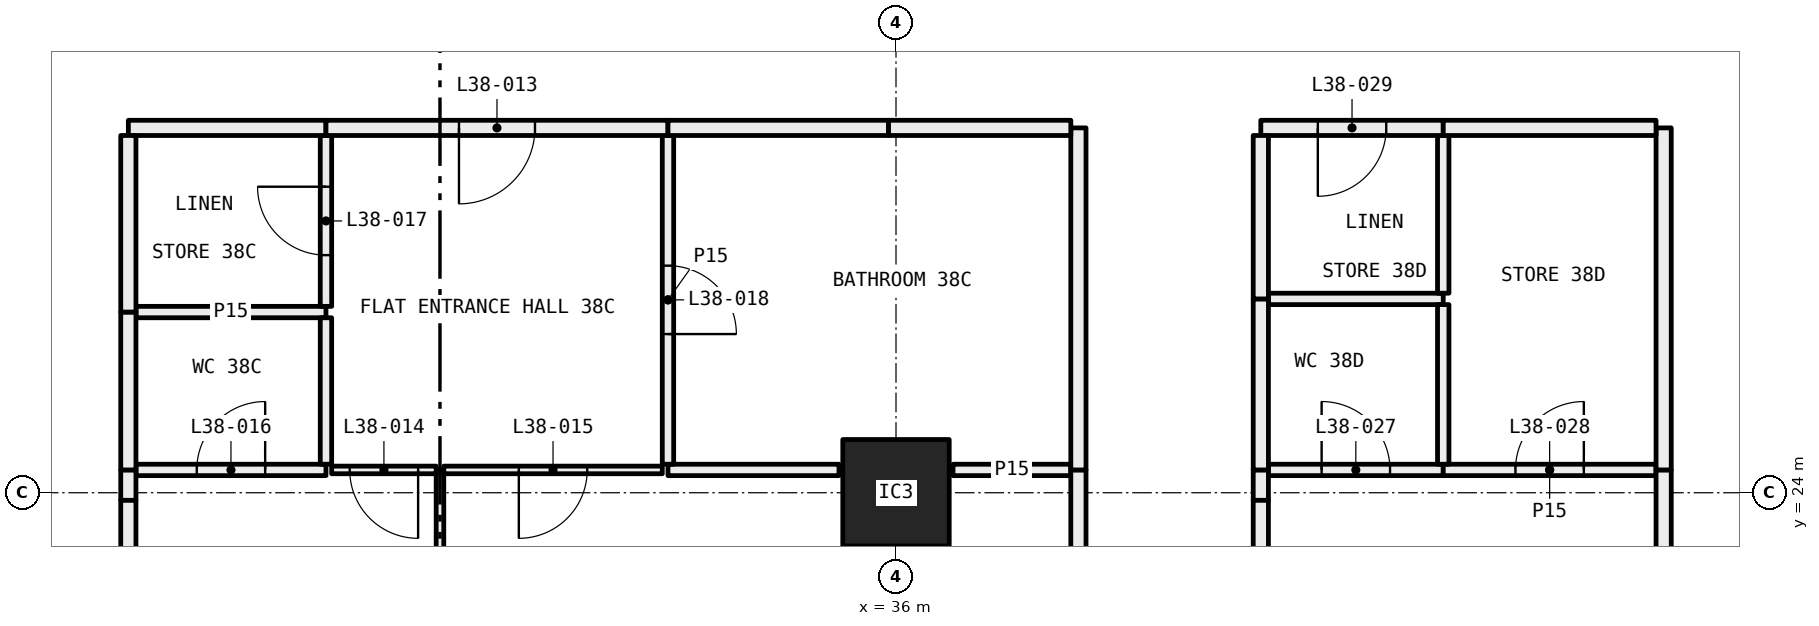
"""IFC4 building model, lengths in metres.
Left out: names, types, materials, properties, quantities, classifications, styles, units other than length and angle.
Written with IfcOpenShell. Run it as: python <this file> out.ifc"""

import sys

from ifc_helpers import new_model, si_unit, direction, frame, frame_2d, origin, origin_2d, place, context, subcontext, project, spatial, rectangle, hollow_rectangle, extrude, element, fill, save


model = new_model("IFC4")
c1 = context("Model", 3, precision=1e-05, world=origin(), true_north=direction((0.0, 1.0)))
c2 = subcontext(c1, "Body", "Model", "MODEL_VIEW")
j1 = project(units=[si_unit("LENGTHUNIT", "METRE"), si_unit("PLANEANGLEUNIT", "RADIAN")], contexts=[c1])
p1 = place(None, origin())
s1 = spatial("IfcSite", under=j1, at=p1, CompositionType="ELEMENT")
p2 = place(p1, origin())
s2 = spatial("IfcBuilding", under=s1, at=p2, CompositionType="ELEMENT")
p3 = place(p2, frame((0.0, 0.0, 144.9)))
s3 = spatial("IfcBuildingStorey", under=s2, at=p3, CompositionType="ELEMENT", Elevation=144.9)
p4 = place(p3, frame((36.0, 24.0, 0.0), z_axis=(0.0, 0.0, 1.0), x_axis=(1.0, 0.0, 0.0)))
e1 = element("IfcColumn", 1, at=p4, inside=s3, PredefinedType="COLUMN", context=c2, shape_type="SweptSolid", body=[
    extrude(hollow_rectangle(XDim=1.4, YDim=1.4, WallThickness=0.06, at=origin_2d()), origin(), (0.0, 0.0, 1.0), 3.05),
])
p5 = place(p3, frame((30.0, 18.1, 0.0), z_axis=(0.0, 0.0, 1.0), x_axis=(0.0, 1.0, 0.0)))
e2 = element("IfcWall", 2, at=p5, inside=s3, PredefinedType="PARTITIONING", context=c2, shape_type="SweptSolid", body=[
    extrude(rectangle(XDim=6.2, YDim=0.1, at=frame_2d((3.1, 0.0))), origin(), (0.0, 0.0, 1.0), 2.45),
])
p6 = place(p3, frame((28.5, 24.3, 0.0), z_axis=(0.0, 0.0, 1.0), x_axis=(-1.0, 0.0, 0.0)))
e3 = element("IfcWall", 3, at=p6, inside=s3, PredefinedType="PARTITIONING", context=c2, shape_type="SweptSolid", body=[
    extrude(rectangle(XDim=2.5, YDim=0.15, at=frame_2d((1.25, 0.0))), origin(), (0.0, 0.0, 1.0), 3.05),
])
p7 = place(p6, frame((0.8, 0.0, 0.0)))
e4 = element("IfcOpeningElement", 4, at=p7, cuts=e3, PredefinedType="OPENING", context=c2, shape_type="SweptSolid", body=[
    extrude(rectangle(XDim=0.9, YDim=2.1, at=frame_2d((0.45, 1.05))), frame((0.0, 0.085, 0.0), z_axis=(0.0, -1.0, 0.0), x_axis=(1.0, 0.0, 0.0)), (0.0, 0.0, 1.0), 0.17),
])
p8 = place(p3, frame((29.95, 24.3, 0.0), z_axis=(0.0, 0.0, 1.0), x_axis=(-1.0, 0.0, 0.0)))
e5 = element("IfcWall", 5, at=p8, inside=s3, PredefinedType="PARTITIONING", context=c2, shape_type="SweptSolid", body=[
    extrude(rectangle(XDim=1.375, YDim=0.1, at=frame_2d((0.688, 0.0))), origin(), (0.0, 0.0, 1.0), 3.05),
])
p9 = place(p8, frame((0.238, 0.0, 0.0)))
e6 = element("IfcOpeningElement", 6, at=p9, cuts=e5, PredefinedType="OPENING", context=c2, shape_type="SweptSolid", body=[
    extrude(rectangle(XDim=0.9, YDim=2.1, at=frame_2d((0.45, 1.05))), frame((0.0, 0.06, 0.0), z_axis=(0.0, -1.0, 0.0), x_axis=(1.0, 0.0, 0.0)), (0.0, 0.0, 1.0), 0.12),
])
p10 = place(p3, frame((25.9, 24.3, 0.0), z_axis=(0.0, 0.0, 1.0), x_axis=(0.0, -1.0, 0.0)))
e7 = element("IfcWall", 7, at=p10, inside=s3, PredefinedType="PARTITIONING", context=c2, shape_type="SweptSolid", body=[
    extrude(rectangle(XDim=0.4, YDim=0.2, at=frame_2d((0.2, 0.0))), origin(), (0.0, 0.0, 1.0), 2.45),
])
p11 = place(p3, frame((25.9, 23.9, 0.0), z_axis=(0.0, 0.0, 1.0), x_axis=(0.0, -1.0, 0.0)))
e8 = element("IfcWall", 8, at=p11, inside=s3, PredefinedType="PARTITIONING", context=c2, shape_type="SweptSolid", body=[
    extrude(rectangle(XDim=5.8, YDim=0.2, at=frame_2d((2.9, 0.0))), origin(), (0.0, 0.0, 1.0), 3.05),
])
p12 = place(p3, frame((32.925, 24.3, 0.0), z_axis=(0.0, 0.0, 1.0), x_axis=(-1.0, 0.0, 0.0)))
e9 = element("IfcWall", 9, at=p12, inside=s3, PredefinedType="PARTITIONING", context=c2, shape_type="SweptSolid", body=[
    extrude(rectangle(XDim=2.875, YDim=0.1, at=frame_2d((1.438, 0.0))), origin(), (0.0, 0.0, 1.0), 3.05),
])
p13 = place(p12, frame((0.988, 0.0, 0.0)))
e10 = element("IfcOpeningElement", 10, at=p13, cuts=e9, PredefinedType="OPENING", context=c2, shape_type="SweptSolid", body=[
    extrude(rectangle(XDim=0.9, YDim=2.1, at=frame_2d((0.45, 1.05))), frame((0.0, 0.06, 0.0), z_axis=(0.0, -1.0, 0.0), x_axis=(1.0, 0.0, 0.0)), (0.0, 0.0, 1.0), 0.12),
])
p14 = place(p3, frame((35.25, 24.3, 0.0), z_axis=(0.0, 0.0, 1.0), x_axis=(-1.0, 0.0, 0.0)))
e11 = element("IfcWall", 11, at=p14, inside=s3, PredefinedType="PARTITIONING", context=c2, shape_type="SweptSolid", body=[
    extrude(rectangle(XDim=2.25, YDim=0.15, at=frame_2d((1.125, 0.0))), origin(), (0.0, 0.0, 1.0), 3.05),
])
p15 = place(p3, frame((38.3, 24.3, 0.0), z_axis=(0.0, 0.0, 1.0), x_axis=(-1.0, 0.0, 0.0)))
e12 = element("IfcWall", 12, at=p15, inside=s3, PredefinedType="PARTITIONING", context=c2, shape_type="SweptSolid", body=[
    extrude(rectangle(XDim=1.55, YDim=0.15, at=frame_2d((0.775, 0.0))), origin(), (0.0, 0.0, 1.0), 3.05),
])
p16 = place(p3, frame((38.4, 18.1, 0.0), z_axis=(0.0, 0.0, 1.0), x_axis=(0.0, 1.0, 0.0)))
e13 = element("IfcWall", 13, at=p16, inside=s3, PredefinedType="PARTITIONING", context=c2, shape_type="SweptSolid", body=[
    extrude(rectangle(XDim=6.2, YDim=0.2, at=frame_2d((3.1, 0.0))), origin(), (0.0, 0.0, 1.0), 2.45),
])
p17 = place(p3, frame((28.5, 26.377, 0.0), z_axis=(0.0, 0.0, 1.0), x_axis=(-1.0, 0.0, 0.0)))
e14 = element("IfcWall", 14, at=p17, inside=s3, PredefinedType="PARTITIONING", context=c2, shape_type="SweptSolid", body=[
    extrude(rectangle(XDim=2.5, YDim=0.15, at=frame_2d((1.25, 0.0))), origin(), (0.0, 0.0, 1.0), 3.05),
])
p18 = place(p3, frame((28.5, 24.375, 0.0), z_axis=(0.0, 0.0, 1.0), x_axis=(0.0, 1.0, 0.0)))
e15 = element("IfcWall", 15, at=p18, inside=s3, PredefinedType="PARTITIONING", context=c2, shape_type="SweptSolid", body=[
    extrude(rectangle(XDim=1.927, YDim=0.15, at=frame_2d((0.963, 0.0))), origin(), (0.0, 0.0, 1.0), 3.05),
])
p19 = place(p3, frame((25.9, 26.377, 0.0), z_axis=(0.0, 0.0, 1.0), x_axis=(0.0, -1.0, 0.0)))
e16 = element("IfcWall", 16, at=p19, inside=s3, PredefinedType="PARTITIONING", context=c2, shape_type="SweptSolid", body=[
    extrude(rectangle(XDim=2.077, YDim=0.2, at=frame_2d((1.039, 0.0))), origin(), (0.0, 0.0, 1.0), 3.05),
])
p20 = place(p3, frame((28.5, 26.452, 0.0), z_axis=(0.0, 0.0, 1.0), x_axis=(0.0, 1.0, 0.0)))
e17 = element("IfcWall", 17, at=p20, inside=s3, PredefinedType="PARTITIONING", context=c2, shape_type="SweptSolid", body=[
    extrude(rectangle(XDim=2.248, YDim=0.15, at=frame_2d((1.124, 0.0))), origin(), (0.0, 0.0, 1.0), 3.05),
])
p21 = place(p20, frame((0.674, 0.0, 0.0)))
e18 = element("IfcOpeningElement", 18, at=p21, cuts=e17, PredefinedType="OPENING", context=c2, shape_type="SweptSolid", body=[
    extrude(rectangle(XDim=0.9, YDim=2.1, at=frame_2d((0.45, 1.05))), frame((0.0, 0.085, 0.0), z_axis=(0.0, -1.0, 0.0), x_axis=(1.0, 0.0, 0.0)), (0.0, 0.0, 1.0), 0.17),
])
p22 = place(p3, frame((28.5, 28.8, 0.0), z_axis=(0.0, 0.0, 1.0), x_axis=(-1.0, 0.0, 0.0)))
e19 = element("IfcWall", 19, at=p22, inside=s3, PredefinedType="PARTITIONING", context=c2, shape_type="SweptSolid", body=[
    extrude(rectangle(XDim=2.6, YDim=0.2, at=frame_2d((1.3, 0.0))), origin(), (0.0, 0.0, 1.0), 3.05),
])
p23 = place(p3, frame((25.9, 28.7, 0.0), z_axis=(0.0, 0.0, 1.0), x_axis=(0.0, -1.0, 0.0)))
e20 = element("IfcWall", 20, at=p23, inside=s3, PredefinedType="PARTITIONING", context=c2, shape_type="SweptSolid", body=[
    extrude(rectangle(XDim=2.323, YDim=0.2, at=frame_2d((1.162, 0.0))), origin(), (0.0, 0.0, 1.0), 3.05),
])
p24 = place(p3, frame((33.0, 24.375, 0.0), z_axis=(0.0, 0.0, 1.0), x_axis=(0.0, 1.0, 0.0)))
e21 = element("IfcWall", 21, at=p24, inside=s3, PredefinedType="PARTITIONING", context=c2, shape_type="SweptSolid", body=[
    extrude(rectangle(XDim=4.325, YDim=0.15, at=frame_2d((2.163, 0.0))), origin(), (0.0, 0.0, 1.0), 3.05),
])
p25 = place(p24, frame((1.712, 0.0, 0.0)))
e22 = element("IfcOpeningElement", 22, at=p25, cuts=e21, PredefinedType="OPENING", context=c2, shape_type="SweptSolid", body=[
    extrude(rectangle(XDim=0.9, YDim=2.1, at=frame_2d((0.45, 1.05))), frame((0.0, 0.085, 0.0), z_axis=(0.0, -1.0, 0.0), x_axis=(1.0, 0.0, 0.0)), (0.0, 0.0, 1.0), 0.17),
])
p26 = place(p3, frame((33.0, 28.8, 0.0), z_axis=(0.0, 0.0, 1.0), x_axis=(-1.0, 0.0, 0.0)))
e23 = element("IfcWall", 23, at=p26, inside=s3, PredefinedType="PARTITIONING", context=c2, shape_type="SweptSolid", body=[
    extrude(rectangle(XDim=4.5, YDim=0.2, at=frame_2d((2.25, 0.0))), origin(), (0.0, 0.0, 1.0), 3.05),
])
p27 = place(p26, frame((1.75, 0.0, 0.0)))
e24 = element("IfcOpeningElement", 24, at=p27, cuts=e23, PredefinedType="OPENING", context=c2, shape_type="SweptSolid", body=[
    extrude(rectangle(XDim=1.0, YDim=2.1, at=frame_2d((0.5, 1.05))), frame((0.0, 0.11, 0.0), z_axis=(0.0, -1.0, 0.0), x_axis=(1.0, 0.0, 0.0)), (0.0, 0.0, 1.0), 0.22),
])
p28 = place(p3, frame((38.4, 24.3, 0.0), z_axis=(0.0, 0.0, 1.0), x_axis=(0.0, 1.0, 0.0)))
e25 = element("IfcWall", 25, at=p28, inside=s3, PredefinedType="PARTITIONING", context=c2, shape_type="SweptSolid", body=[
    extrude(rectangle(XDim=4.5, YDim=0.2, at=frame_2d((2.25, 0.0))), origin(), (0.0, 0.0, 1.0), 3.05),
])
p29 = place(p3, frame((38.3, 28.8, 0.0), z_axis=(0.0, 0.0, 1.0), x_axis=(-1.0, 0.0, 0.0)))
e26 = element("IfcWall", 26, at=p29, inside=s3, PredefinedType="PARTITIONING", context=c2, shape_type="SweptSolid", body=[
    extrude(rectangle(XDim=2.4, YDim=0.2, at=frame_2d((1.2, 0.0))), origin(), (0.0, 0.0, 1.0), 2.45),
])
p30 = place(p3, frame((35.9, 28.8, 0.0), z_axis=(0.0, 0.0, 1.0), x_axis=(-1.0, 0.0, 0.0)))
e27 = element("IfcWall", 27, at=p30, inside=s3, PredefinedType="PARTITIONING", context=c2, shape_type="SweptSolid", body=[
    extrude(rectangle(XDim=2.9, YDim=0.2, at=frame_2d((1.45, 0.0))), origin(), (0.0, 0.0, 1.0), 3.05),
])
p31 = place(p3, frame((43.2, 24.3, 0.0), z_axis=(0.0, 0.0, 1.0), x_axis=(-1.0, 0.0, 0.0)))
e28 = element("IfcWall", 28, at=p31, inside=s3, PredefinedType="PARTITIONING", context=c2, shape_type="SweptSolid", body=[
    extrude(rectangle(XDim=2.3, YDim=0.15, at=frame_2d((1.15, 0.0))), origin(), (0.0, 0.0, 1.0), 3.05),
])
p32 = place(p31, frame((0.7, 0.0, 0.0)))
e29 = element("IfcOpeningElement", 29, at=p32, cuts=e28, PredefinedType="OPENING", context=c2, shape_type="SweptSolid", body=[
    extrude(rectangle(XDim=0.9, YDim=2.1, at=frame_2d((0.45, 1.05))), frame((0.0, 0.085, 0.0), z_axis=(0.0, -1.0, 0.0), x_axis=(1.0, 0.0, 0.0)), (0.0, 0.0, 1.0), 0.17),
])
p33 = place(p3, frame((46.0, 24.3, 0.0), z_axis=(0.0, 0.0, 1.0), x_axis=(-1.0, 0.0, 0.0)))
e30 = element("IfcWall", 30, at=p33, inside=s3, PredefinedType="PARTITIONING", context=c2, shape_type="SweptSolid", body=[
    extrude(rectangle(XDim=2.8, YDim=0.15, at=frame_2d((1.4, 0.0))), origin(), (0.0, 0.0, 1.0), 3.05),
])
p34 = place(p33, frame((0.95, 0.0, 0.0)))
e31 = element("IfcOpeningElement", 31, at=p34, cuts=e30, PredefinedType="OPENING", context=c2, shape_type="SweptSolid", body=[
    extrude(rectangle(XDim=0.9, YDim=2.1, at=frame_2d((0.45, 1.05))), frame((0.0, 0.085, 0.0), z_axis=(0.0, -1.0, 0.0), x_axis=(1.0, 0.0, 0.0)), (0.0, 0.0, 1.0), 0.17),
])
p35 = place(p3, frame((40.8, 24.3, 0.0), z_axis=(0.0, 0.0, 1.0), x_axis=(0.0, -1.0, 0.0)))
e32 = element("IfcWall", 32, at=p35, inside=s3, PredefinedType="PARTITIONING", context=c2, shape_type="SweptSolid", body=[
    extrude(rectangle(XDim=0.4, YDim=0.2, at=frame_2d((0.2, 0.0))), origin(), (0.0, 0.0, 1.0), 2.45),
])
p36 = place(p3, frame((40.8, 23.9, 0.0), z_axis=(0.0, 0.0, 1.0), x_axis=(0.0, -1.0, 0.0)))
e33 = element("IfcWall", 33, at=p36, inside=s3, PredefinedType="PARTITIONING", context=c2, shape_type="SweptSolid", body=[
    extrude(rectangle(XDim=5.8, YDim=0.2, at=frame_2d((2.9, 0.0))), origin(), (0.0, 0.0, 1.0), 3.05),
])
p37 = place(p3, frame((46.1, 18.1, 0.0), z_axis=(0.0, 0.0, 1.0), x_axis=(0.0, 1.0, 0.0)))
e34 = element("IfcWall", 34, at=p37, inside=s3, PredefinedType="PARTITIONING", context=c2, shape_type="SweptSolid", body=[
    extrude(rectangle(XDim=6.2, YDim=0.2, at=frame_2d((3.1, 0.0))), origin(), (0.0, 0.0, 1.0), 2.45),
])
p38 = place(p3, frame((43.2, 26.55, 0.0), z_axis=(0.0, 0.0, 1.0), x_axis=(-1.0, 0.0, 0.0)))
e35 = element("IfcWall", 35, at=p38, inside=s3, PredefinedType="PARTITIONING", context=c2, shape_type="SweptSolid", body=[
    extrude(rectangle(XDim=2.3, YDim=0.15, at=frame_2d((1.15, 0.0))), origin(), (0.0, 0.0, 1.0), 3.05),
])
p39 = place(p3, frame((43.2, 24.375, 0.0), z_axis=(0.0, 0.0, 1.0), x_axis=(0.0, 1.0, 0.0)))
e36 = element("IfcWall", 36, at=p39, inside=s3, PredefinedType="PARTITIONING", context=c2, shape_type="SweptSolid", body=[
    extrude(rectangle(XDim=2.1, YDim=0.15, at=frame_2d((1.05, 0.0))), origin(), (0.0, 0.0, 1.0), 3.05),
])
p40 = place(p3, frame((40.8, 26.55, 0.0), z_axis=(0.0, 0.0, 1.0), x_axis=(0.0, -1.0, 0.0)))
e37 = element("IfcWall", 37, at=p40, inside=s3, PredefinedType="PARTITIONING", context=c2, shape_type="SweptSolid", body=[
    extrude(rectangle(XDim=2.25, YDim=0.2, at=frame_2d((1.125, 0.0))), origin(), (0.0, 0.0, 1.0), 3.05),
])
p41 = place(p3, frame((43.2, 26.625, 0.0), z_axis=(0.0, 0.0, 1.0), x_axis=(0.0, 1.0, 0.0)))
e38 = element("IfcWall", 38, at=p41, inside=s3, PredefinedType="PARTITIONING", context=c2, shape_type="SweptSolid", body=[
    extrude(rectangle(XDim=2.075, YDim=0.15, at=frame_2d((1.038, 0.0))), origin(), (0.0, 0.0, 1.0), 3.05),
])
p42 = place(p3, frame((43.2, 28.8, 0.0), z_axis=(0.0, 0.0, 1.0), x_axis=(-1.0, 0.0, 0.0)))
e39 = element("IfcWall", 39, at=p42, inside=s3, PredefinedType="PARTITIONING", context=c2, shape_type="SweptSolid", body=[
    extrude(rectangle(XDim=2.4, YDim=0.2, at=frame_2d((1.2, 0.0))), origin(), (0.0, 0.0, 1.0), 3.05),
])
p43 = place(p42, frame((0.75, 0.0, 0.0)))
e40 = element("IfcOpeningElement", 40, at=p43, cuts=e39, PredefinedType="OPENING", context=c2, shape_type="SweptSolid", body=[
    extrude(rectangle(XDim=0.9, YDim=2.1, at=frame_2d((0.45, 1.05))), frame((0.0, 0.11, 0.0), z_axis=(0.0, -1.0, 0.0), x_axis=(1.0, 0.0, 0.0)), (0.0, 0.0, 1.0), 0.22),
])
p44 = place(p3, frame((40.8, 28.7, 0.0), z_axis=(0.0, 0.0, 1.0), x_axis=(0.0, -1.0, 0.0)))
e41 = element("IfcWall", 41, at=p44, inside=s3, PredefinedType="PARTITIONING", context=c2, shape_type="SweptSolid", body=[
    extrude(rectangle(XDim=2.15, YDim=0.2, at=frame_2d((1.075, 0.0))), origin(), (0.0, 0.0, 1.0), 3.05),
])
p45 = place(p3, frame((46.1, 24.3, 0.0), z_axis=(0.0, 0.0, 1.0), x_axis=(0.0, 1.0, 0.0)))
e42 = element("IfcWall", 42, at=p45, inside=s3, PredefinedType="PARTITIONING", context=c2, shape_type="SweptSolid", body=[
    extrude(rectangle(XDim=4.5, YDim=0.2, at=frame_2d((2.25, 0.0))), origin(), (0.0, 0.0, 1.0), 3.05),
])
p46 = place(p3, frame((46.0, 28.8, 0.0), z_axis=(0.0, 0.0, 1.0), x_axis=(-1.0, 0.0, 0.0)))
e43 = element("IfcWall", 43, at=p46, inside=s3, PredefinedType="PARTITIONING", context=c2, shape_type="SweptSolid", body=[
    extrude(rectangle(XDim=2.8, YDim=0.2, at=frame_2d((1.4, 0.0))), origin(), (0.0, 0.0, 1.0), 3.05),
])
p47 = place(p27, origin())
e44 = element("IfcDoor", 44, at=p47, inside=s3, OperationType="SINGLE_SWING_LEFT", PredefinedType="DOOR", context=c2, shape_type="SweptSolid", body=[
    extrude(rectangle(XDim=1.0, YDim=2.1, at=frame_2d((0.5, 1.05))), frame((0.0, 0.025, 0.0), z_axis=(0.0, -1.0, 0.0), x_axis=(1.0, 0.0, 0.0)), (0.0, 0.0, 1.0), 0.05),
])
fill(e24, e44)
p48 = place(p9, origin())
e45 = element("IfcDoor", 45, at=p48, inside=s3, OperationType="SINGLE_SWING_RIGHT", PredefinedType="DOOR", context=c2, shape_type="SweptSolid", body=[
    extrude(rectangle(XDim=0.9, YDim=2.1, at=frame_2d((0.45, 1.05))), frame((0.0, 0.025, 0.0), z_axis=(0.0, -1.0, 0.0), x_axis=(1.0, 0.0, 0.0)), (0.0, 0.0, 1.0), 0.05),
])
fill(e6, e45)
p49 = place(p13, origin())
e46 = element("IfcDoor", 46, at=p49, inside=s3, OperationType="SINGLE_SWING_LEFT", PredefinedType="DOOR", context=c2, shape_type="SweptSolid", body=[
    extrude(rectangle(XDim=0.9, YDim=2.1, at=frame_2d((0.45, 1.05))), frame((0.0, 0.025, 0.0), z_axis=(0.0, -1.0, 0.0), x_axis=(1.0, 0.0, 0.0)), (0.0, 0.0, 1.0), 0.05),
])
fill(e10, e46)
p50 = place(p7, frame((0.9, 0.0, 0.0), x_axis=(-1.0, 0.0, 0.0)))
e47 = element("IfcDoor", 47, at=p50, inside=s3, OperationType="SINGLE_SWING_LEFT", PredefinedType="DOOR", context=c2, shape_type="SweptSolid", body=[
    extrude(rectangle(XDim=0.9, YDim=2.1, at=frame_2d((0.45, 1.05))), frame((0.0, 0.025, 0.0), z_axis=(0.0, -1.0, 0.0), x_axis=(1.0, 0.0, 0.0)), (0.0, 0.0, 1.0), 0.05),
])
fill(e4, e47)
p51 = place(p21, origin())
e48 = element("IfcDoor", 48, at=p51, inside=s3, OperationType="SINGLE_SWING_LEFT", PredefinedType="DOOR", context=c2, shape_type="SweptSolid", body=[
    extrude(rectangle(XDim=0.9, YDim=2.1, at=frame_2d((0.45, 1.05))), frame((0.0, 0.025, 0.0), z_axis=(0.0, -1.0, 0.0), x_axis=(1.0, 0.0, 0.0)), (0.0, 0.0, 1.0), 0.05),
])
fill(e18, e48)
p52 = place(p25, frame((0.9, 0.0, 0.0), x_axis=(-1.0, 0.0, 0.0)))
e49 = element("IfcDoor", 49, at=p52, inside=s3, OperationType="SINGLE_SWING_LEFT", PredefinedType="DOOR", context=c2, shape_type="SweptSolid", body=[
    extrude(rectangle(XDim=0.9, YDim=2.1, at=frame_2d((0.45, 1.05))), frame((0.0, 0.025, 0.0), z_axis=(0.0, -1.0, 0.0), x_axis=(1.0, 0.0, 0.0)), (0.0, 0.0, 1.0), 0.05),
])
fill(e22, e49)
p53 = place(p32, frame((0.9, 0.0, 0.0), x_axis=(-1.0, 0.0, 0.0)))
e50 = element("IfcDoor", 50, at=p53, inside=s3, OperationType="SINGLE_SWING_RIGHT", PredefinedType="DOOR", context=c2, shape_type="SweptSolid", body=[
    extrude(rectangle(XDim=0.9, YDim=2.1, at=frame_2d((0.45, 1.05))), frame((0.0, 0.025, 0.0), z_axis=(0.0, -1.0, 0.0), x_axis=(1.0, 0.0, 0.0)), (0.0, 0.0, 1.0), 0.05),
])
fill(e29, e50)
p54 = place(p34, frame((0.9, 0.0, 0.0), x_axis=(-1.0, 0.0, 0.0)))
e51 = element("IfcDoor", 51, at=p54, inside=s3, OperationType="SINGLE_SWING_LEFT", PredefinedType="DOOR", context=c2, shape_type="SweptSolid", body=[
    extrude(rectangle(XDim=0.9, YDim=2.1, at=frame_2d((0.45, 1.05))), frame((0.0, 0.025, 0.0), z_axis=(0.0, -1.0, 0.0), x_axis=(1.0, 0.0, 0.0)), (0.0, 0.0, 1.0), 0.05),
])
fill(e31, e51)
p55 = place(p43, origin())
e52 = element("IfcDoor", 52, at=p55, inside=s3, OperationType="SINGLE_SWING_LEFT", PredefinedType="DOOR", context=c2, shape_type="SweptSolid", body=[
    extrude(rectangle(XDim=0.9, YDim=2.1, at=frame_2d((0.45, 1.05))), frame((0.0, 0.025, 0.0), z_axis=(0.0, -1.0, 0.0), x_axis=(1.0, 0.0, 0.0)), (0.0, 0.0, 1.0), 0.05),
])
fill(e40, e52)
save(model, sys.argv[1])
